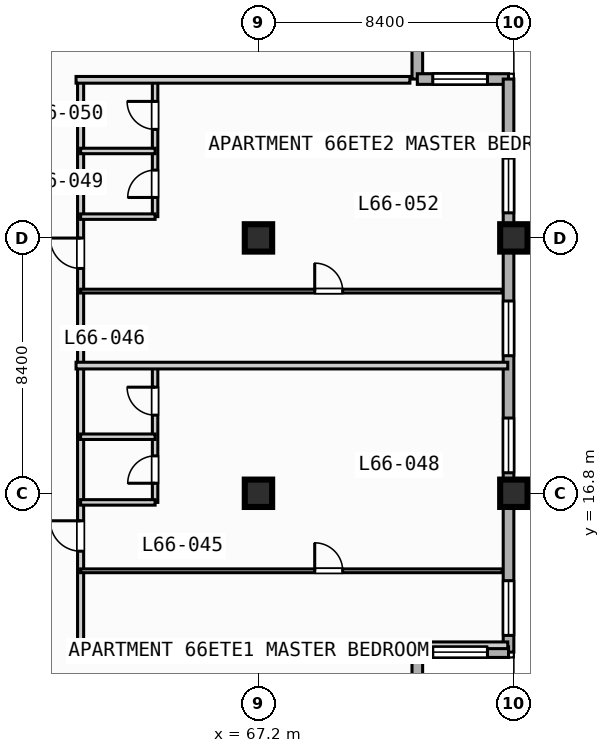
"""IFC4 building model, lengths in metres.
Left out: names, types, materials, properties, quantities, classifications, styles, units other than length and angle.
Written with IfcOpenShell. Run it as: python <this file> out.ifc"""

import sys

from ifc_helpers import new_model, si_unit, direction, frame, frame_2d, origin, origin_2d, place, context, subcontext, project, spatial, rectangle, extrude, element, fill, save


model = new_model("IFC4")
c1 = context("Model", 3, precision=1e-05, world=origin(), true_north=direction((0.0, 1.0)))
c2 = subcontext(c1, "Body", "Model", "MODEL_VIEW")
j1 = project(units=[si_unit("LENGTHUNIT", "METRE"), si_unit("PLANEANGLEUNIT", "RADIAN")], contexts=[c1])
p1 = place(None, origin())
s1 = spatial("IfcSite", under=j1, at=p1, CompositionType="ELEMENT")
p2 = place(p1, origin())
s2 = spatial("IfcBuilding", under=s1, at=p2, CompositionType="ELEMENT")
p3 = place(p2, frame((0.0, 0.0, 267.5)))
s3 = spatial("IfcBuildingStorey", under=s2, at=p3, CompositionType="ELEMENT", Elevation=267.5)
for number, where, z_axis, x_axis in (
    (1, (67.2, 16.8, 0.0), (0.0, 0.0, 1.0), (1.0, 0.0, 0.0)),
    (2, (67.2, 25.2, 0.0), (0.0, 0.0, 1.0), (1.0, 0.0, 0.0)),
    (3, (75.6, 16.8, 0.0), (0.0, 0.0, 1.0), (1.0, 0.0, 0.0)),
    (4, (75.6, 25.2, 0.0), (0.0, 0.0, 1.0), (1.0, 0.0, 0.0)),
):
    element("IfcColumn", number, at=place(p3, frame(where, z_axis=z_axis, x_axis=x_axis)), inside=s3, PredefinedType="COLUMN", context=c2, shape_type="SweptSolid", body=[
        extrude(rectangle(XDim=0.9, YDim=0.9, at=origin_2d()), origin(), (0.0, 0.0, 1.0), 3.7),
    ])
p4 = place(p3, frame((72.425, 33.425, 0.0), z_axis=(0.0, 0.0, 1.0), x_axis=(0.0, -1.0, 0.0)))
e5 = element("IfcWall", 5, at=p4, inside=s3, PredefinedType="STANDARD", context=c2, shape_type="SweptSolid", body=[
    extrude(rectangle(XDim=3.0, YDim=0.35, at=frame_2d((1.5, 0.0))), origin(), (0.0, 0.0, 1.0), 3.47),
])
p5 = place(p3, frame((72.425, 30.425, 0.0), z_axis=(0.0, 0.0, 1.0), x_axis=(1.0, 0.0, 0.0)))
e6 = element("IfcWall", 6, at=p5, inside=s3, PredefinedType="STANDARD", context=c2, shape_type="SweptSolid", body=[
    extrude(rectangle(XDim=3.0, YDim=0.35, at=frame_2d((1.5, 0.0))), origin(), (0.0, 0.0, 1.0), 3.47),
])
p6 = place(p5, frame((0.508, 0.0, 0.85)))
e7 = element("IfcOpeningElement", 7, at=p6, cuts=e6, PredefinedType="OPENING", context=c2, shape_type="SweptSolid", body=[
    extrude(rectangle(XDim=1.8, YDim=1.8, at=frame_2d((0.9, 0.9))), frame((0.0, 0.185, 0.0), z_axis=(0.0, -1.0, 0.0), x_axis=(1.0, 0.0, 0.0)), (0.0, 0.0, 1.0), 0.37),
])
p7 = place(p3, frame((75.425, 30.425, 0.0), z_axis=(0.0, 0.0, 1.0), x_axis=(0.0, -1.0, 0.0)))
e8 = element("IfcWall", 8, at=p7, inside=s3, PredefinedType="STANDARD", context=c2, shape_type="SweptSolid", body=[
    extrude(rectangle(XDim=18.85, YDim=0.35, at=frame_2d((9.425, 0.0))), origin(), (0.0, 0.0, 1.0), 3.47),
])
p8 = place(p7, frame((16.5, 0.0, 0.85)))
e9 = element("IfcOpeningElement", 9, at=p8, cuts=e8, PredefinedType="OPENING", context=c2, shape_type="SweptSolid", body=[
    extrude(rectangle(XDim=1.8, YDim=1.8, at=frame_2d((0.9, 0.9))), frame((0.0, 0.185, 0.0), z_axis=(0.0, -1.0, 0.0), x_axis=(1.0, 0.0, 0.0)), (0.0, 0.0, 1.0), 0.37),
])
p9 = place(p7, frame((11.15, 0.0, 0.85)))
e10 = element("IfcOpeningElement", 10, at=p9, cuts=e8, PredefinedType="OPENING", context=c2, shape_type="SweptSolid", body=[
    extrude(rectangle(XDim=1.8, YDim=1.8, at=frame_2d((0.9, 0.9))), frame((0.0, 0.185, 0.0), z_axis=(0.0, -1.0, 0.0), x_axis=(1.0, 0.0, 0.0)), (0.0, 0.0, 1.0), 0.37),
])
p10 = place(p7, frame((7.3, 0.0, 0.85)))
e11 = element("IfcOpeningElement", 11, at=p10, cuts=e8, PredefinedType="OPENING", context=c2, shape_type="SweptSolid", body=[
    extrude(rectangle(XDim=1.8, YDim=1.8, at=frame_2d((0.9, 0.9))), frame((0.0, 0.185, 0.0), z_axis=(0.0, -1.0, 0.0), x_axis=(1.0, 0.0, 0.0)), (0.0, 0.0, 1.0), 0.37),
])
p11 = place(p7, frame((2.6, 0.0, 0.85)))
e12 = element("IfcOpeningElement", 12, at=p11, cuts=e8, PredefinedType="OPENING", context=c2, shape_type="SweptSolid", body=[
    extrude(rectangle(XDim=1.8, YDim=1.8, at=frame_2d((0.9, 0.9))), frame((0.0, 0.185, 0.0), z_axis=(0.0, -1.0, 0.0), x_axis=(1.0, 0.0, 0.0)), (0.0, 0.0, 1.0), 0.37),
])
p12 = place(p3, frame((75.425, 11.575, 0.0), z_axis=(0.0, 0.0, 1.0), x_axis=(-1.0, 0.0, 0.0)))
e13 = element("IfcWall", 13, at=p12, inside=s3, PredefinedType="STANDARD", context=c2, shape_type="SweptSolid", body=[
    extrude(rectangle(XDim=3.0, YDim=0.35, at=frame_2d((1.5, 0.0))), origin(), (0.0, 0.0, 1.0), 3.47),
])
p13 = place(p12, frame((0.692, 0.0, 0.85)))
e14 = element("IfcOpeningElement", 14, at=p13, cuts=e13, PredefinedType="OPENING", context=c2, shape_type="SweptSolid", body=[
    extrude(rectangle(XDim=1.8, YDim=1.8, at=frame_2d((0.9, 0.9))), frame((0.0, 0.185, 0.0), z_axis=(0.0, -1.0, 0.0), x_axis=(1.0, 0.0, 0.0)), (0.0, 0.0, 1.0), 0.37),
])
p14 = place(p3, frame((72.425, 11.575, 0.0), z_axis=(0.0, 0.0, 1.0), x_axis=(0.0, -1.0, 0.0)))
e15 = element("IfcWall", 15, at=p14, inside=s3, PredefinedType="STANDARD", context=c2, shape_type="SweptSolid", body=[
    extrude(rectangle(XDim=3.0, YDim=0.35, at=frame_2d((1.5, 0.0))), origin(), (0.0, 0.0, 1.0), 3.47),
])
p15 = place(p3, frame((61.35, 11.8, 0.0), z_axis=(0.0, 0.0, 1.0), x_axis=(0.0, 1.0, 0.0)))
e16 = element("IfcWall", 16, at=p15, inside=s3, PredefinedType="PARTITIONING", context=c2, shape_type="SweptSolid", body=[
    extrude(rectangle(XDim=18.6, YDim=0.2, at=frame_2d((9.3, 0.0))), origin(), (0.0, 0.0, 1.0), 3.47),
])
p16 = place(p15, frame((3.095, 0.0, 0.0)))
e17 = element("IfcOpeningElement", 17, at=p16, cuts=e16, PredefinedType="OPENING", context=c2, shape_type="SweptSolid", body=[
    extrude(rectangle(XDim=1.0, YDim=2.15, at=frame_2d((0.5, 1.075))), frame((0.0, 0.11, 0.0), z_axis=(0.0, -1.0, 0.0), x_axis=(1.0, 0.0, 0.0)), (0.0, 0.0, 1.0), 0.22),
])
p17 = place(p15, frame((12.395, 0.0, 0.0)))
e18 = element("IfcOpeningElement", 18, at=p17, cuts=e16, PredefinedType="OPENING", context=c2, shape_type="SweptSolid", body=[
    extrude(rectangle(XDim=1.0, YDim=2.15, at=frame_2d((0.5, 1.075))), frame((0.0, 0.11, 0.0), z_axis=(0.0, -1.0, 0.0), x_axis=(1.0, 0.0, 0.0)), (0.0, 0.0, 1.0), 0.22),
])
p18 = place(p3, frame((61.2, 11.8, 0.0), z_axis=(0.0, 0.0, 1.0), x_axis=(1.0, 0.0, 0.0)))
e19 = element("IfcWall", 19, at=p18, inside=s3, PredefinedType="PARTITIONING", context=c2, shape_type="SweptSolid", body=[
    extrude(rectangle(XDim=14.2, YDim=0.22, at=frame_2d((7.1, 0.0))), origin(), (0.0, 0.0, 1.0), 3.47),
])
p19 = place(p3, frame((63.8, 16.5, 0.0), z_axis=(0.0, 0.0, 1.0), x_axis=(0.0, 1.0, 0.0)))
e20 = element("IfcWall", 20, at=p19, inside=s3, PredefinedType="PLUMBINGWALL", context=c2, shape_type="SweptSolid", body=[
    extrude(rectangle(XDim=4.5, YDim=0.18, at=frame_2d((2.25, 0.0))), origin(), (0.0, 0.0, 1.0), 3.47),
])
p20 = place(p19, frame((0.63, 0.0, 0.0)))
e21 = element("IfcOpeningElement", 21, at=p20, cuts=e20, PredefinedType="OPENING", context=c2, shape_type="SweptSolid", body=[
    extrude(rectangle(XDim=0.9, YDim=2.1, at=frame_2d((0.45, 1.05))), frame((0.0, 0.1, 0.0), z_axis=(0.0, -1.0, 0.0), x_axis=(1.0, 0.0, 0.0)), (0.0, 0.0, 1.0), 0.2),
])
p21 = place(p19, frame((2.87, 0.0, 0.0)))
e22 = element("IfcOpeningElement", 22, at=p21, cuts=e20, PredefinedType="OPENING", context=c2, shape_type="SweptSolid", body=[
    extrude(rectangle(XDim=0.92, YDim=2.1, at=frame_2d((0.46, 1.05))), frame((0.0, 0.1, 0.0), z_axis=(0.0, -1.0, 0.0), x_axis=(1.0, 0.0, 0.0)), (0.0, 0.0, 1.0), 0.2),
])
for number, where, z_axis, x_axis in (
    (23, (61.35, 16.5, 0.0), (0.0, 0.0, 1.0), (1.0, 0.0, 0.0)),
    (24, (61.35, 18.66, 0.0), (0.0, 0.0, 1.0), (1.0, 0.0, 0.0)),
):
    element("IfcWall", number, at=place(p3, frame(where, z_axis=z_axis, x_axis=x_axis)), inside=s3, PredefinedType="PLUMBINGWALL", context=c2, shape_type="SweptSolid", body=[
        extrude(rectangle(XDim=2.45, YDim=0.18, at=frame_2d((1.225, 0.0))), origin(), (0.0, 0.0, 1.0), 3.47),
    ])
p22 = place(p3, frame((61.35, 14.25, 0.0), z_axis=(0.0, 0.0, 1.0), x_axis=(1.0, 0.0, 0.0)))
e25 = element("IfcWall", 25, at=p22, inside=s3, PredefinedType="PARTITIONING", context=c2, shape_type="SweptSolid", body=[
    extrude(rectangle(XDim=13.87, YDim=0.125, at=frame_2d((6.935, 0.0))), origin(), (0.0, 0.0, 1.0), 3.47),
])
p23 = place(p22, frame((7.7, 0.0, 0.0)))
e26 = element("IfcOpeningElement", 26, at=p23, cuts=e25, PredefinedType="OPENING", context=c2, shape_type="SweptSolid", body=[
    extrude(rectangle(XDim=0.92, YDim=2.1, at=frame_2d((0.46, 1.05))), frame((0.0, 0.073, 0.0), z_axis=(0.0, -1.0, 0.0), x_axis=(1.0, 0.0, 0.0)), (0.0, 0.0, 1.0), 0.145),
])
p24 = place(p3, frame((61.2, 21.0, 0.0), z_axis=(0.0, 0.0, 1.0), x_axis=(1.0, 0.0, 0.0)))
e27 = element("IfcWall", 27, at=p24, inside=s3, PredefinedType="PARTITIONING", context=c2, shape_type="SweptSolid", body=[
    extrude(rectangle(XDim=14.2, YDim=0.22, at=frame_2d((7.1, 0.0))), origin(), (0.0, 0.0, 1.0), 3.47),
])
p25 = place(p3, frame((63.8, 25.9, 0.0), z_axis=(0.0, 0.0, 1.0), x_axis=(0.0, 1.0, 0.0)))
e28 = element("IfcWall", 28, at=p25, inside=s3, PredefinedType="PLUMBINGWALL", context=c2, shape_type="SweptSolid", body=[
    extrude(rectangle(XDim=4.5, YDim=0.18, at=frame_2d((2.25, 0.0))), origin(), (0.0, 0.0, 1.0), 3.47),
])
p26 = place(p25, frame((0.63, 0.0, 0.0)))
e29 = element("IfcOpeningElement", 29, at=p26, cuts=e28, PredefinedType="OPENING", context=c2, shape_type="SweptSolid", body=[
    extrude(rectangle(XDim=0.9, YDim=2.1, at=frame_2d((0.45, 1.05))), frame((0.0, 0.1, 0.0), z_axis=(0.0, -1.0, 0.0), x_axis=(1.0, 0.0, 0.0)), (0.0, 0.0, 1.0), 0.2),
])
p27 = place(p25, frame((2.87, 0.0, 0.0)))
e30 = element("IfcOpeningElement", 30, at=p27, cuts=e28, PredefinedType="OPENING", context=c2, shape_type="SweptSolid", body=[
    extrude(rectangle(XDim=0.92, YDim=2.1, at=frame_2d((0.46, 1.05))), frame((0.0, 0.1, 0.0), z_axis=(0.0, -1.0, 0.0), x_axis=(1.0, 0.0, 0.0)), (0.0, 0.0, 1.0), 0.2),
])
for number, where, z_axis, x_axis in (
    (31, (61.35, 25.9, 0.0), (0.0, 0.0, 1.0), (1.0, 0.0, 0.0)),
    (32, (61.35, 28.06, 0.0), (0.0, 0.0, 1.0), (1.0, 0.0, 0.0)),
):
    element("IfcWall", number, at=place(p3, frame(where, z_axis=z_axis, x_axis=x_axis)), inside=s3, PredefinedType="PLUMBINGWALL", context=c2, shape_type="SweptSolid", body=[
        extrude(rectangle(XDim=2.45, YDim=0.18, at=frame_2d((1.225, 0.0))), origin(), (0.0, 0.0, 1.0), 3.47),
    ])
p28 = place(p3, frame((61.35, 23.45, 0.0), z_axis=(0.0, 0.0, 1.0), x_axis=(1.0, 0.0, 0.0)))
e33 = element("IfcWall", 33, at=p28, inside=s3, PredefinedType="PARTITIONING", context=c2, shape_type="SweptSolid", body=[
    extrude(rectangle(XDim=13.87, YDim=0.125, at=frame_2d((6.935, 0.0))), origin(), (0.0, 0.0, 1.0), 3.47),
])
p29 = place(p28, frame((7.7, 0.0, 0.0)))
e34 = element("IfcOpeningElement", 34, at=p29, cuts=e33, PredefinedType="OPENING", context=c2, shape_type="SweptSolid", body=[
    extrude(rectangle(XDim=0.92, YDim=2.1, at=frame_2d((0.46, 1.05))), frame((0.0, 0.073, 0.0), z_axis=(0.0, -1.0, 0.0), x_axis=(1.0, 0.0, 0.0)), (0.0, 0.0, 1.0), 0.145),
])
p30 = place(p3, frame((61.2, 30.4, 0.0), z_axis=(0.0, 0.0, 1.0), x_axis=(1.0, 0.0, 0.0)))
e35 = element("IfcWall", 35, at=p30, inside=s3, PredefinedType="PARTITIONING", context=c2, shape_type="SweptSolid", body=[
    extrude(rectangle(XDim=10.98, YDim=0.22, at=frame_2d((5.49, 0.0))), origin(), (0.0, 0.0, 1.0), 3.47),
])
p31 = place(p6, origin())
e36 = element("IfcWindow", 36, at=p31, inside=s3, PartitioningType="SINGLE_PANEL", PredefinedType="WINDOW", context=c2, shape_type="SweptSolid", body=[
    extrude(rectangle(XDim=1.8, YDim=1.8, at=frame_2d((0.9, 0.9))), frame((0.0, 0.03, 0.0), z_axis=(0.0, -1.0, 0.0), x_axis=(1.0, 0.0, 0.0)), (0.0, 0.0, 1.0), 0.06),
])
fill(e7, e36)
p32 = place(p8, origin())
e37 = element("IfcWindow", 37, at=p32, inside=s3, PartitioningType="SINGLE_PANEL", PredefinedType="WINDOW", context=c2, shape_type="SweptSolid", body=[
    extrude(rectangle(XDim=1.8, YDim=1.8, at=frame_2d((0.9, 0.9))), frame((0.0, 0.03, 0.0), z_axis=(0.0, -1.0, 0.0), x_axis=(1.0, 0.0, 0.0)), (0.0, 0.0, 1.0), 0.06),
])
fill(e9, e37)
p33 = place(p9, origin())
e38 = element("IfcWindow", 38, at=p33, inside=s3, PartitioningType="SINGLE_PANEL", PredefinedType="WINDOW", context=c2, shape_type="SweptSolid", body=[
    extrude(rectangle(XDim=1.8, YDim=1.8, at=frame_2d((0.9, 0.9))), frame((0.0, 0.03, 0.0), z_axis=(0.0, -1.0, 0.0), x_axis=(1.0, 0.0, 0.0)), (0.0, 0.0, 1.0), 0.06),
])
fill(e10, e38)
p34 = place(p10, origin())
e39 = element("IfcWindow", 39, at=p34, inside=s3, PartitioningType="SINGLE_PANEL", PredefinedType="WINDOW", context=c2, shape_type="SweptSolid", body=[
    extrude(rectangle(XDim=1.8, YDim=1.8, at=frame_2d((0.9, 0.9))), frame((0.0, 0.03, 0.0), z_axis=(0.0, -1.0, 0.0), x_axis=(1.0, 0.0, 0.0)), (0.0, 0.0, 1.0), 0.06),
])
fill(e11, e39)
p35 = place(p11, origin())
e40 = element("IfcWindow", 40, at=p35, inside=s3, PartitioningType="SINGLE_PANEL", PredefinedType="WINDOW", context=c2, shape_type="SweptSolid", body=[
    extrude(rectangle(XDim=1.8, YDim=1.8, at=frame_2d((0.9, 0.9))), frame((0.0, 0.03, 0.0), z_axis=(0.0, -1.0, 0.0), x_axis=(1.0, 0.0, 0.0)), (0.0, 0.0, 1.0), 0.06),
])
fill(e12, e40)
p36 = place(p13, origin())
e41 = element("IfcWindow", 41, at=p36, inside=s3, PartitioningType="SINGLE_PANEL", PredefinedType="WINDOW", context=c2, shape_type="SweptSolid", body=[
    extrude(rectangle(XDim=1.8, YDim=1.8, at=frame_2d((0.9, 0.9))), frame((0.0, 0.03, 0.0), z_axis=(0.0, -1.0, 0.0), x_axis=(1.0, 0.0, 0.0)), (0.0, 0.0, 1.0), 0.06),
])
fill(e14, e41)
p37 = place(p16, origin())
e42 = element("IfcDoor", 42, at=p37, inside=s3, OperationType="SINGLE_SWING_RIGHT", PredefinedType="DOOR", context=c2, shape_type="SweptSolid", body=[
    extrude(rectangle(XDim=1.0, YDim=2.15, at=frame_2d((0.5, 1.075))), frame((0.0, 0.025, 0.0), z_axis=(0.0, -1.0, 0.0), x_axis=(1.0, 0.0, 0.0)), (0.0, 0.0, 1.0), 0.05),
])
fill(e17, e42)
p38 = place(p17, origin())
e43 = element("IfcDoor", 43, at=p38, inside=s3, OperationType="SINGLE_SWING_RIGHT", PredefinedType="DOOR", context=c2, shape_type="SweptSolid", body=[
    extrude(rectangle(XDim=1.0, YDim=2.15, at=frame_2d((0.5, 1.075))), frame((0.0, 0.025, 0.0), z_axis=(0.0, -1.0, 0.0), x_axis=(1.0, 0.0, 0.0)), (0.0, 0.0, 1.0), 0.05),
])
fill(e18, e43)
p39 = place(p20, origin())
e44 = element("IfcDoor", 44, at=p39, inside=s3, OperationType="SINGLE_SWING_LEFT", PredefinedType="DOOR", context=c2, shape_type="SweptSolid", body=[
    extrude(rectangle(XDim=0.9, YDim=2.1, at=frame_2d((0.45, 1.05))), frame((0.0, 0.025, 0.0), z_axis=(0.0, -1.0, 0.0), x_axis=(1.0, 0.0, 0.0)), (0.0, 0.0, 1.0), 0.05),
])
fill(e21, e44)
p40 = place(p21, origin())
e45 = element("IfcDoor", 45, at=p40, inside=s3, OperationType="SINGLE_SWING_RIGHT", PredefinedType="DOOR", context=c2, shape_type="SweptSolid", body=[
    extrude(rectangle(XDim=0.92, YDim=2.1, at=frame_2d((0.46, 1.05))), frame((0.0, 0.025, 0.0), z_axis=(0.0, -1.0, 0.0), x_axis=(1.0, 0.0, 0.0)), (0.0, 0.0, 1.0), 0.05),
])
fill(e22, e45)
p41 = place(p23, origin())
e46 = element("IfcDoor", 46, at=p41, inside=s3, OperationType="SINGLE_SWING_LEFT", PredefinedType="DOOR", context=c2, shape_type="SweptSolid", body=[
    extrude(rectangle(XDim=0.92, YDim=2.1, at=frame_2d((0.46, 1.05))), frame((0.0, 0.025, 0.0), z_axis=(0.0, -1.0, 0.0), x_axis=(1.0, 0.0, 0.0)), (0.0, 0.0, 1.0), 0.05),
])
fill(e26, e46)
p42 = place(p26, origin())
e47 = element("IfcDoor", 47, at=p42, inside=s3, OperationType="SINGLE_SWING_LEFT", PredefinedType="DOOR", context=c2, shape_type="SweptSolid", body=[
    extrude(rectangle(XDim=0.9, YDim=2.1, at=frame_2d((0.45, 1.05))), frame((0.0, 0.025, 0.0), z_axis=(0.0, -1.0, 0.0), x_axis=(1.0, 0.0, 0.0)), (0.0, 0.0, 1.0), 0.05),
])
fill(e29, e47)
p43 = place(p27, origin())
e48 = element("IfcDoor", 48, at=p43, inside=s3, OperationType="SINGLE_SWING_RIGHT", PredefinedType="DOOR", context=c2, shape_type="SweptSolid", body=[
    extrude(rectangle(XDim=0.92, YDim=2.1, at=frame_2d((0.46, 1.05))), frame((0.0, 0.025, 0.0), z_axis=(0.0, -1.0, 0.0), x_axis=(1.0, 0.0, 0.0)), (0.0, 0.0, 1.0), 0.05),
])
fill(e30, e48)
p44 = place(p29, origin())
e49 = element("IfcDoor", 49, at=p44, inside=s3, OperationType="SINGLE_SWING_LEFT", PredefinedType="DOOR", context=c2, shape_type="SweptSolid", body=[
    extrude(rectangle(XDim=0.92, YDim=2.1, at=frame_2d((0.46, 1.05))), frame((0.0, 0.025, 0.0), z_axis=(0.0, -1.0, 0.0), x_axis=(1.0, 0.0, 0.0)), (0.0, 0.0, 1.0), 0.05),
])
fill(e34, e49)
save(model, sys.argv[1])
